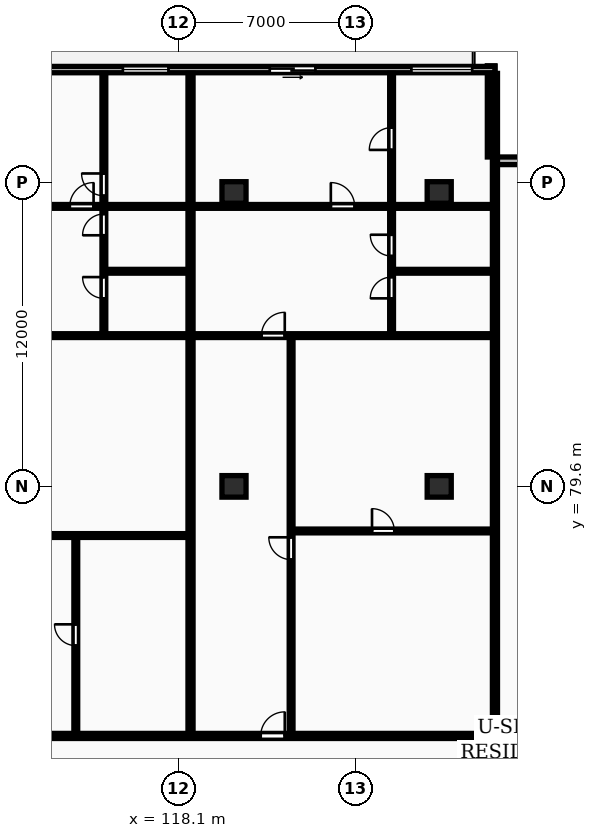
"""IFC4 building model, lengths in metres.
Left out: names, types, materials, properties, quantities, classifications, styles, units other than length and angle.
Written with IfcOpenShell. Run it as: python <this file> out.ifc"""

import sys

from ifc_helpers import new_model, si_unit, direction, frame, frame_2d, origin, origin_2d, place, context, subcontext, project, spatial, rectangle, extrude, element, fill, save


model = new_model("IFC4")
c1 = context("Model", 3, precision=1e-05, world=origin(), true_north=direction((0.0, 1.0)))
c2 = subcontext(c1, "Body", "Model", "MODEL_VIEW")
j1 = project(units=[si_unit("LENGTHUNIT", "METRE"), si_unit("PLANEANGLEUNIT", "RADIAN")], contexts=[c1])
p1 = place(None, origin())
s1 = spatial("IfcSite", under=j1, at=p1, CompositionType="ELEMENT")
p2 = place(p1, origin())
s2 = spatial("IfcBuilding", under=s1, at=p2, CompositionType="ELEMENT")
p3 = place(p2, frame((0.0, 0.0, 106.8)))
s3 = spatial("IfcBuildingStorey", under=s2, at=p3, CompositionType="ELEMENT", Elevation=106.8)
for number, where, z_axis, x_axis in (
    (1, (120.3, 79.6, 0.0), (0.0, 0.0, 1.0), (1.0, 0.0, 0.0)),
    (2, (120.3, 91.2, 0.0), (0.0, 0.0, 1.0), (1.0, 0.0, 0.0)),
    (3, (128.4, 79.6, 0.0), (0.0, 0.0, 1.0), (1.0, 0.0, 0.0)),
    (4, (128.4, 91.2, 0.0), (0.0, 0.0, 1.0), (1.0, 0.0, 0.0)),
):
    element("IfcColumn", number, at=place(p3, frame(where, z_axis=z_axis, x_axis=x_axis)), inside=s3, PredefinedType="COLUMN", context=c2, shape_type="SweptSolid", body=[
        extrude(rectangle(XDim=0.95, YDim=0.85, at=origin_2d()), origin(), (0.0, 0.0, 1.0), 3.25),
    ])
for number, where, z_axis, x_axis in (
    (5, (134.2, 92.45, 0.0), (0.0, 0.0, 1.0), (-1.0, 0.0, 0.0)),
    (6, (130.45, 92.6, 0.0), (0.0, 0.0, 1.0), (0.0, 1.0, 0.0)),
):
    element("IfcWall", number, at=place(p3, frame(where, z_axis=z_axis, x_axis=x_axis)), inside=s3, PredefinedType="STANDARD", context=c2, shape_type="SweptSolid", body=[
        extrude(rectangle(XDim=3.6, YDim=0.3, at=frame_2d((1.8, 0.0))), origin(), (0.0, 0.0, 1.0), 2.97),
    ])
p4 = place(p3, frame((130.6, 96.05, 0.0), z_axis=(0.0, 0.0, 1.0), x_axis=(-1.0, 0.0, 0.0)))
e7 = element("IfcWall", 7, at=p4, inside=s3, PredefinedType="STANDARD", context=c2, shape_type="SweptSolid", body=[
    extrude(rectangle(XDim=73.0, YDim=0.25, at=frame_2d((36.5, 0.0))), origin(), (0.0, 0.0, 1.0), 2.97),
])
p5 = place(p4, frame((68.319, 0.0, 0.0)))
e8 = element("IfcOpeningElement", 8, at=p5, cuts=e7, PredefinedType="OPENING", context=c2, shape_type="SweptSolid", body=[
    extrude(rectangle(XDim=1.8, YDim=2.2, at=frame_2d((0.9, 1.1))), frame((0.0, 0.135, 0.0), z_axis=(0.0, -1.0, 0.0), x_axis=(1.0, 0.0, 0.0)), (0.0, 0.0, 1.0), 0.27),
])
p6 = place(p4, frame((59.277, 0.0, 0.85)))
e9 = element("IfcOpeningElement", 9, at=p6, cuts=e7, PredefinedType="OPENING", context=c2, shape_type="SweptSolid", body=[
    extrude(rectangle(XDim=2.4, YDim=1.9, at=frame_2d((1.2, 0.95))), frame((0.0, 0.135, 0.0), z_axis=(0.0, -1.0, 0.0), x_axis=(1.0, 0.0, 0.0)), (0.0, 0.0, 1.0), 0.27),
])
p7 = place(p4, frame((50.199, 0.0, 0.0)))
e10 = element("IfcOpeningElement", 10, at=p7, cuts=e7, PredefinedType="OPENING", context=c2, shape_type="SweptSolid", body=[
    extrude(rectangle(XDim=1.8, YDim=2.2, at=frame_2d((0.9, 1.1))), frame((0.0, 0.135, 0.0), z_axis=(0.0, -1.0, 0.0), x_axis=(1.0, 0.0, 0.0)), (0.0, 0.0, 1.0), 0.27),
])
p8 = place(p4, frame((40.481, 0.0, 0.85)))
e11 = element("IfcOpeningElement", 11, at=p8, cuts=e7, PredefinedType="OPENING", context=c2, shape_type="SweptSolid", body=[
    extrude(rectangle(XDim=2.4, YDim=1.9, at=frame_2d((1.2, 0.95))), frame((0.0, 0.135, 0.0), z_axis=(0.0, -1.0, 0.0), x_axis=(1.0, 0.0, 0.0)), (0.0, 0.0, 1.0), 0.27),
])
p9 = place(p4, frame((31.93, 0.0, 0.0)))
e12 = element("IfcOpeningElement", 12, at=p9, cuts=e7, PredefinedType="OPENING", context=c2, shape_type="SweptSolid", body=[
    extrude(rectangle(XDim=1.8, YDim=2.2, at=frame_2d((0.9, 1.1))), frame((0.0, 0.135, 0.0), z_axis=(0.0, -1.0, 0.0), x_axis=(1.0, 0.0, 0.0)), (0.0, 0.0, 1.0), 0.27),
])
p10 = place(p4, frame((26.042, 0.0, 0.85)))
e13 = element("IfcOpeningElement", 13, at=p10, cuts=e7, PredefinedType="OPENING", context=c2, shape_type="SweptSolid", body=[
    extrude(rectangle(XDim=2.4, YDim=1.9, at=frame_2d((1.2, 0.95))), frame((0.0, 0.135, 0.0), z_axis=(0.0, -1.0, 0.0), x_axis=(1.0, 0.0, 0.0)), (0.0, 0.0, 1.0), 0.27),
])
p11 = place(p4, frame((19.15, 0.0, 0.0)))
e14 = element("IfcOpeningElement", 14, at=p11, cuts=e7, PredefinedType="OPENING", context=c2, shape_type="SweptSolid", body=[
    extrude(rectangle(XDim=1.8, YDim=2.2, at=frame_2d((0.9, 1.1))), frame((0.0, 0.135, 0.0), z_axis=(0.0, -1.0, 0.0), x_axis=(1.0, 0.0, 0.0)), (0.0, 0.0, 1.0), 0.27),
])
p12 = place(p4, frame((12.886, 0.0, 0.85)))
e15 = element("IfcOpeningElement", 15, at=p12, cuts=e7, PredefinedType="OPENING", context=c2, shape_type="SweptSolid", body=[
    extrude(rectangle(XDim=1.8, YDim=1.8, at=frame_2d((0.9, 0.9))), frame((0.0, 0.135, 0.0), z_axis=(0.0, -1.0, 0.0), x_axis=(1.0, 0.0, 0.0)), (0.0, 0.0, 1.0), 0.27),
])
p13 = place(p4, frame((7.088, 0.0, 0.0)))
e16 = element("IfcOpeningElement", 16, at=p13, cuts=e7, PredefinedType="OPENING", context=c2, shape_type="SweptSolid", body=[
    extrude(rectangle(XDim=1.8, YDim=2.2, at=frame_2d((0.9, 1.1))), frame((0.0, 0.135, 0.0), z_axis=(0.0, -1.0, 0.0), x_axis=(1.0, 0.0, 0.0)), (0.0, 0.0, 1.0), 0.27),
])
p14 = place(p4, frame((0.9, 0.0, 0.85)))
e17 = element("IfcOpeningElement", 17, at=p14, cuts=e7, PredefinedType="OPENING", context=c2, shape_type="SweptSolid", body=[
    extrude(rectangle(XDim=2.4, YDim=1.9, at=frame_2d((1.2, 0.95))), frame((0.0, 0.135, 0.0), z_axis=(0.0, -1.0, 0.0), x_axis=(1.0, 0.0, 0.0)), (0.0, 0.0, 1.0), 0.27),
])
for number, where, z_axis, x_axis in (
    (18, (130.6, 69.83, 0.0), (0.0, 0.0, 1.0), (0.0, 1.0, 0.0)),
    (19, (118.584, 69.83, 0.0), (0.0, 0.0, 1.0), (0.0, 1.0, 0.0)),
):
    element("IfcWall", number, at=place(p3, frame(where, z_axis=z_axis, x_axis=x_axis)), inside=s3, PredefinedType="PARTITIONING", context=c2, shape_type="SweptSolid", body=[
        extrude(rectangle(XDim=26.07, YDim=0.2, at=frame_2d((13.035, 0.0))), origin(), (0.0, 0.0, 1.0), 2.97),
    ])
p15 = place(p3, frame((114.055, 69.81, 0.0), z_axis=(0.0, 0.0, 1.0), x_axis=(0.0, 1.0, 0.0)))
e20 = element("IfcWall", 20, at=p15, inside=s3, PredefinedType="PARTITIONING", context=c2, shape_type="SweptSolid", body=[
    extrude(rectangle(XDim=7.85, YDim=0.15, at=frame_2d((3.925, 0.0))), origin(), (0.0, 0.0, 1.0), 2.97),
])
p16 = place(p15, frame((3.505, 0.0, 0.0)))
e21 = element("IfcOpeningElement", 21, at=p16, cuts=e20, PredefinedType="OPENING", context=c2, shape_type="SweptSolid", body=[
    extrude(rectangle(XDim=0.84, YDim=2.04, at=frame_2d((0.42, 1.02))), frame((0.0, 0.085, 0.0), z_axis=(0.0, -1.0, 0.0), x_axis=(1.0, 0.0, 0.0)), (0.0, 0.0, 1.0), 0.17),
])
p17 = place(p3, frame((109.847, 77.66, 0.0), z_axis=(0.0, 0.0, 1.0), x_axis=(1.0, 0.0, 0.0)))
e22 = element("IfcWall", 22, at=p17, inside=s3, PredefinedType="PARTITIONING", context=c2, shape_type="SweptSolid", body=[
    extrude(rectangle(XDim=8.657, YDim=0.15, at=frame_2d((4.329, 0.0))), origin(), (0.0, 0.0, 1.0), 2.97),
])
p18 = place(p17, frame((0.35, 0.0, 0.0)))
e23 = element("IfcOpeningElement", 23, at=p18, cuts=e22, PredefinedType="OPENING", context=c2, shape_type="SweptSolid", body=[
    extrude(rectangle(XDim=0.88, YDim=2.06, at=frame_2d((0.44, 1.03))), frame((0.0, 0.085, 0.0), z_axis=(0.0, -1.0, 0.0), x_axis=(1.0, 0.0, 0.0)), (0.0, 0.0, 1.0), 0.17),
])
p19 = place(p3, frame((115.224, 88.09, 0.0), z_axis=(0.0, 0.0, 1.0), x_axis=(1.0, 0.0, 0.0)))
e24 = element("IfcWall", 24, at=p19, inside=s3, PredefinedType="PARTITIONING", context=c2, shape_type="SweptSolid", body=[
    extrude(rectangle(XDim=3.28, YDim=0.15, at=frame_2d((1.64, 0.0))), origin(), (0.0, 0.0, 1.0), 2.97),
])
p20 = place(p3, frame((115.164, 85.59, 0.0), z_axis=(0.0, 0.0, 1.0), x_axis=(0.0, 1.0, 0.0)))
e25 = element("IfcWall", 25, at=p20, inside=s3, PredefinedType="PARTITIONING", context=c2, shape_type="SweptSolid", body=[
    extrude(rectangle(XDim=10.31, YDim=0.15, at=frame_2d((5.155, 0.0))), origin(), (0.0, 0.0, 1.0), 2.97),
])
p21 = place(p20, frame((1.43, 0.0, 0.0)))
e26 = element("IfcOpeningElement", 26, at=p21, cuts=e25, PredefinedType="OPENING", context=c2, shape_type="SweptSolid", body=[
    extrude(rectangle(XDim=0.84, YDim=2.04, at=frame_2d((0.42, 1.02))), frame((0.0, 0.085, 0.0), z_axis=(0.0, -1.0, 0.0), x_axis=(1.0, 0.0, 0.0)), (0.0, 0.0, 1.0), 0.17),
])
p22 = place(p20, frame((3.92, 0.0, 0.0)))
e27 = element("IfcOpeningElement", 27, at=p22, cuts=e25, PredefinedType="OPENING", context=c2, shape_type="SweptSolid", body=[
    extrude(rectangle(XDim=0.84, YDim=2.04, at=frame_2d((0.42, 1.02))), frame((0.0, 0.085, 0.0), z_axis=(0.0, -1.0, 0.0), x_axis=(1.0, 0.0, 0.0)), (0.0, 0.0, 1.0), 0.17),
])
p23 = place(p20, frame((5.48, 0.0, 0.0)))
e28 = element("IfcOpeningElement", 28, at=p23, cuts=e25, PredefinedType="OPENING", context=c2, shape_type="SweptSolid", body=[
    extrude(rectangle(XDim=0.88, YDim=2.06, at=frame_2d((0.44, 1.03))), frame((0.0, 0.085, 0.0), z_axis=(0.0, -1.0, 0.0), x_axis=(1.0, 0.0, 0.0)), (0.0, 0.0, 1.0), 0.17),
])
p24 = place(p3, frame((105.896, 85.55, 0.0), z_axis=(0.0, 0.0, 1.0), x_axis=(1.0, 0.0, 0.0)))
e29 = element("IfcWall", 29, at=p24, inside=s3, PredefinedType="PARTITIONING", context=c2, shape_type="SweptSolid", body=[
    extrude(rectangle(XDim=12.607, YDim=0.15, at=frame_2d((6.304, 0.0))), origin(), (0.0, 0.0, 1.0), 2.97),
])
p25 = place(p24, frame((2.72, 0.0, 0.0)))
e30 = element("IfcOpeningElement", 30, at=p25, cuts=e29, PredefinedType="OPENING", context=c2, shape_type="SweptSolid", body=[
    extrude(rectangle(XDim=0.92, YDim=2.08, at=frame_2d((0.46, 1.04))), frame((0.0, 0.085, 0.0), z_axis=(0.0, -1.0, 0.0), x_axis=(1.0, 0.0, 0.0)), (0.0, 0.0, 1.0), 0.17),
])
p26 = place(p3, frame((105.896, 90.65, 0.0), z_axis=(0.0, 0.0, 1.0), x_axis=(1.0, 0.0, 0.0)))
e31 = element("IfcWall", 31, at=p26, inside=s3, PredefinedType="PARTITIONING", context=c2, shape_type="SweptSolid", body=[
    extrude(rectangle(XDim=12.607, YDim=0.15, at=frame_2d((6.304, 0.0))), origin(), (0.0, 0.0, 1.0), 2.97),
])
p27 = place(p26, frame((7.921, 0.0, 0.0)))
e32 = element("IfcOpeningElement", 32, at=p27, cuts=e31, PredefinedType="OPENING", context=c2, shape_type="SweptSolid", body=[
    extrude(rectangle(XDim=0.94, YDim=2.1, at=frame_2d((0.47, 1.05))), frame((0.0, 0.085, 0.0), z_axis=(0.0, -1.0, 0.0), x_axis=(1.0, 0.0, 0.0)), (0.0, 0.0, 1.0), 0.17),
])
p28 = place(p3, frame((122.614, 77.84, 0.0), z_axis=(0.0, 0.0, 1.0), x_axis=(1.0, 0.0, 0.0)))
e33 = element("IfcWall", 33, at=p28, inside=s3, PredefinedType="PARTITIONING", context=c2, shape_type="SweptSolid", body=[
    extrude(rectangle(XDim=7.906, YDim=0.15, at=frame_2d((3.953, 0.0))), origin(), (0.0, 0.0, 1.0), 2.97),
])
p29 = place(p28, frame((3.134, 0.0, 0.0)))
e34 = element("IfcOpeningElement", 34, at=p29, cuts=e33, PredefinedType="OPENING", context=c2, shape_type="SweptSolid", body=[
    extrude(rectangle(XDim=0.88, YDim=2.06, at=frame_2d((0.44, 1.03))), frame((0.0, 0.085, 0.0), z_axis=(0.0, -1.0, 0.0), x_axis=(1.0, 0.0, 0.0)), (0.0, 0.0, 1.0), 0.17),
])
p30 = place(p3, frame((122.554, 69.81, 0.0), z_axis=(0.0, 0.0, 1.0), x_axis=(0.0, 1.0, 0.0)))
e35 = element("IfcWall", 35, at=p30, inside=s3, PredefinedType="PARTITIONING", context=c2, shape_type="SweptSolid", body=[
    extrude(rectangle(XDim=15.7, YDim=0.15, at=frame_2d((7.85, 0.0))), origin(), (0.0, 0.0, 1.0), 2.97),
])
p31 = place(p30, frame((6.9, 0.0, 0.0)))
e36 = element("IfcOpeningElement", 36, at=p31, cuts=e35, PredefinedType="OPENING", context=c2, shape_type="SweptSolid", body=[
    extrude(rectangle(XDim=0.88, YDim=2.06, at=frame_2d((0.44, 1.03))), frame((0.0, 0.085, 0.0), z_axis=(0.0, -1.0, 0.0), x_axis=(1.0, 0.0, 0.0)), (0.0, 0.0, 1.0), 0.17),
])
p32 = place(p3, frame((126.58, 88.09, 0.0), z_axis=(0.0, 0.0, 1.0), x_axis=(1.0, 0.0, 0.0)))
e37 = element("IfcWall", 37, at=p32, inside=s3, PredefinedType="PARTITIONING", context=c2, shape_type="SweptSolid", body=[
    extrude(rectangle(XDim=3.94, YDim=0.15, at=frame_2d((1.97, 0.0))), origin(), (0.0, 0.0, 1.0), 2.97),
])
p33 = place(p3, frame((126.52, 85.59, 0.0), z_axis=(0.0, 0.0, 1.0), x_axis=(0.0, 1.0, 0.0)))
e38 = element("IfcWall", 38, at=p33, inside=s3, PredefinedType="PARTITIONING", context=c2, shape_type="SweptSolid", body=[
    extrude(rectangle(XDim=10.31, YDim=0.15, at=frame_2d((5.155, 0.0))), origin(), (0.0, 0.0, 1.0), 2.97),
])
p34 = place(p33, frame((1.43, 0.0, 0.0)))
e39 = element("IfcOpeningElement", 39, at=p34, cuts=e38, PredefinedType="OPENING", context=c2, shape_type="SweptSolid", body=[
    extrude(rectangle(XDim=0.84, YDim=2.04, at=frame_2d((0.42, 1.02))), frame((0.0, 0.085, 0.0), z_axis=(0.0, -1.0, 0.0), x_axis=(1.0, 0.0, 0.0)), (0.0, 0.0, 1.0), 0.17),
])
p35 = place(p33, frame((3.102, 0.0, 0.0)))
e40 = element("IfcOpeningElement", 40, at=p35, cuts=e38, PredefinedType="OPENING", context=c2, shape_type="SweptSolid", body=[
    extrude(rectangle(XDim=0.84, YDim=2.04, at=frame_2d((0.42, 1.02))), frame((0.0, 0.085, 0.0), z_axis=(0.0, -1.0, 0.0), x_axis=(1.0, 0.0, 0.0)), (0.0, 0.0, 1.0), 0.17),
])
p36 = place(p33, frame((7.29, 0.0, 0.0)))
e41 = element("IfcOpeningElement", 41, at=p36, cuts=e38, PredefinedType="OPENING", context=c2, shape_type="SweptSolid", body=[
    extrude(rectangle(XDim=0.88, YDim=2.06, at=frame_2d((0.44, 1.03))), frame((0.0, 0.085, 0.0), z_axis=(0.0, -1.0, 0.0), x_axis=(1.0, 0.0, 0.0)), (0.0, 0.0, 1.0), 0.17),
])
p37 = place(p3, frame((118.664, 85.55, 0.0), z_axis=(0.0, 0.0, 1.0), x_axis=(1.0, 0.0, 0.0)))
e42 = element("IfcWall", 42, at=p37, inside=s3, PredefinedType="PARTITIONING", context=c2, shape_type="SweptSolid", body=[
    extrude(rectangle(XDim=11.856, YDim=0.15, at=frame_2d((5.928, 0.0))), origin(), (0.0, 0.0, 1.0), 2.97),
])
p38 = place(p37, frame((2.72, 0.0, 0.0)))
e43 = element("IfcOpeningElement", 43, at=p38, cuts=e42, PredefinedType="OPENING", context=c2, shape_type="SweptSolid", body=[
    extrude(rectangle(XDim=0.92, YDim=2.08, at=frame_2d((0.46, 1.04))), frame((0.0, 0.085, 0.0), z_axis=(0.0, -1.0, 0.0), x_axis=(1.0, 0.0, 0.0)), (0.0, 0.0, 1.0), 0.17),
])
p39 = place(p3, frame((118.664, 90.65, 0.0), z_axis=(0.0, 0.0, 1.0), x_axis=(1.0, 0.0, 0.0)))
e44 = element("IfcWall", 44, at=p39, inside=s3, PredefinedType="PARTITIONING", context=c2, shape_type="SweptSolid", body=[
    extrude(rectangle(XDim=11.856, YDim=0.15, at=frame_2d((5.928, 0.0))), origin(), (0.0, 0.0, 1.0), 2.97),
])
p40 = place(p39, frame((5.458, 0.0, 0.0)))
e45 = element("IfcOpeningElement", 45, at=p40, cuts=e44, PredefinedType="OPENING", context=c2, shape_type="SweptSolid", body=[
    extrude(rectangle(XDim=0.94, YDim=2.1, at=frame_2d((0.47, 1.05))), frame((0.0, 0.085, 0.0), z_axis=(0.0, -1.0, 0.0), x_axis=(1.0, 0.0, 0.0)), (0.0, 0.0, 1.0), 0.17),
])
p41 = place(p3, frame((57.6, 69.75, 0.0), z_axis=(0.0, 0.0, 1.0), x_axis=(1.0, 0.0, 0.0)))
e46 = element("IfcWall", 46, at=p41, inside=s3, PredefinedType="PARTITIONING", context=c2, shape_type="SweptSolid", body=[
    extrude(rectangle(XDim=73.0, YDim=0.2, at=frame_2d((36.5, 0.0))), origin(), (0.0, 0.0, 1.0), 2.97),
])
p42 = place(p41, frame((7.172, 0.0, 0.0)))
e47 = element("IfcOpeningElement", 47, at=p42, cuts=e46, PredefinedType="OPENING", context=c2, shape_type="SweptSolid", body=[
    extrude(rectangle(XDim=1.22, YDim=2.18, at=frame_2d((0.61, 1.09))), frame((0.0, 0.11, 0.0), z_axis=(0.0, -1.0, 0.0), x_axis=(1.0, 0.0, 0.0)), (0.0, 0.0, 1.0), 0.22),
])
p43 = place(p41, frame((23.96, 0.0, 0.0)))
e48 = element("IfcOpeningElement", 48, at=p43, cuts=e46, PredefinedType="OPENING", context=c2, shape_type="SweptSolid", body=[
    extrude(rectangle(XDim=1.22, YDim=2.18, at=frame_2d((0.61, 1.09))), frame((0.0, 0.11, 0.0), z_axis=(0.0, -1.0, 0.0), x_axis=(1.0, 0.0, 0.0)), (0.0, 0.0, 1.0), 0.22),
])
p44 = place(p41, frame((38.846, 0.0, 0.0)))
e49 = element("IfcOpeningElement", 49, at=p44, cuts=e46, PredefinedType="OPENING", context=c2, shape_type="SweptSolid", body=[
    extrude(rectangle(XDim=0.95, YDim=2.15, at=frame_2d((0.475, 1.075))), frame((0.0, 0.11, 0.0), z_axis=(0.0, -1.0, 0.0), x_axis=(1.0, 0.0, 0.0)), (0.0, 0.0, 1.0), 0.22),
])
p45 = place(p41, frame((50.262, 0.0, 0.0)))
e50 = element("IfcOpeningElement", 50, at=p45, cuts=e46, PredefinedType="OPENING", context=c2, shape_type="SweptSolid", body=[
    extrude(rectangle(XDim=0.95, YDim=2.15, at=frame_2d((0.475, 1.075))), frame((0.0, 0.11, 0.0), z_axis=(0.0, -1.0, 0.0), x_axis=(1.0, 0.0, 0.0)), (0.0, 0.0, 1.0), 0.22),
])
p46 = place(p41, frame((63.754, 0.0, 0.0)))
e51 = element("IfcOpeningElement", 51, at=p46, cuts=e46, PredefinedType="OPENING", context=c2, shape_type="SweptSolid", body=[
    extrude(rectangle(XDim=0.95, YDim=2.15, at=frame_2d((0.475, 1.075))), frame((0.0, 0.11, 0.0), z_axis=(0.0, -1.0, 0.0), x_axis=(1.0, 0.0, 0.0)), (0.0, 0.0, 1.0), 0.22),
])
p47 = place(p12, origin())
e52 = element("IfcWindow", 52, at=p47, inside=s3, PartitioningType="SINGLE_PANEL", PredefinedType="WINDOW", context=c2, shape_type="SweptSolid", body=[
    extrude(rectangle(XDim=1.8, YDim=1.8, at=frame_2d((0.9, 0.9))), frame((0.0, 0.03, 0.0), z_axis=(0.0, -1.0, 0.0), x_axis=(1.0, 0.0, 0.0)), (0.0, 0.0, 1.0), 0.06),
])
fill(e15, e52)
p48 = place(p13, origin())
e53 = element("IfcDoor", 53, at=p48, inside=s3, OperationType="SLIDING_TO_LEFT", PredefinedType="DOOR", context=c2, shape_type="SweptSolid", body=[
    extrude(rectangle(XDim=1.8, YDim=2.2, at=frame_2d((0.9, 1.1))), frame((0.0, 0.025, 0.0), z_axis=(0.0, -1.0, 0.0), x_axis=(1.0, 0.0, 0.0)), (0.0, 0.0, 1.0), 0.05),
])
fill(e16, e53)
p49 = place(p14, origin())
e54 = element("IfcWindow", 54, at=p49, inside=s3, PartitioningType="DOUBLE_PANEL_VERTICAL", PredefinedType="WINDOW", context=c2, shape_type="SweptSolid", body=[
    extrude(rectangle(XDim=2.4, YDim=1.9, at=frame_2d((1.2, 0.95))), frame((0.0, 0.03, 0.0), z_axis=(0.0, -1.0, 0.0), x_axis=(1.0, 0.0, 0.0)), (0.0, 0.0, 1.0), 0.06),
])
fill(e17, e54)
p50 = place(p16, origin())
e55 = element("IfcDoor", 55, at=p50, inside=s3, OperationType="SINGLE_SWING_RIGHT", PredefinedType="DOOR", context=c2, shape_type="SweptSolid", body=[
    extrude(rectangle(XDim=0.84, YDim=2.04, at=frame_2d((0.42, 1.02))), frame((0.0, 0.025, 0.0), z_axis=(0.0, -1.0, 0.0), x_axis=(1.0, 0.0, 0.0)), (0.0, 0.0, 1.0), 0.05),
])
fill(e21, e55)
p51 = place(p21, origin())
e56 = element("IfcDoor", 56, at=p51, inside=s3, OperationType="SINGLE_SWING_RIGHT", PredefinedType="DOOR", context=c2, shape_type="SweptSolid", body=[
    extrude(rectangle(XDim=0.84, YDim=2.04, at=frame_2d((0.42, 1.02))), frame((0.0, 0.025, 0.0), z_axis=(0.0, -1.0, 0.0), x_axis=(1.0, 0.0, 0.0)), (0.0, 0.0, 1.0), 0.05),
])
fill(e26, e56)
p52 = place(p22, origin())
e57 = element("IfcDoor", 57, at=p52, inside=s3, OperationType="SINGLE_SWING_LEFT", PredefinedType="DOOR", context=c2, shape_type="SweptSolid", body=[
    extrude(rectangle(XDim=0.84, YDim=2.04, at=frame_2d((0.42, 1.02))), frame((0.0, 0.025, 0.0), z_axis=(0.0, -1.0, 0.0), x_axis=(1.0, 0.0, 0.0)), (0.0, 0.0, 1.0), 0.05),
])
fill(e27, e57)
p53 = place(p23, origin())
e58 = element("IfcDoor", 58, at=p53, inside=s3, OperationType="SINGLE_SWING_RIGHT", PredefinedType="DOOR", context=c2, shape_type="SweptSolid", body=[
    extrude(rectangle(XDim=0.88, YDim=2.06, at=frame_2d((0.44, 1.03))), frame((0.0, 0.025, 0.0), z_axis=(0.0, -1.0, 0.0), x_axis=(1.0, 0.0, 0.0)), (0.0, 0.0, 1.0), 0.05),
])
fill(e28, e58)
p54 = place(p27, origin())
e59 = element("IfcDoor", 59, at=p54, inside=s3, OperationType="SINGLE_SWING_RIGHT", PredefinedType="DOOR", context=c2, shape_type="SweptSolid", body=[
    extrude(rectangle(XDim=0.94, YDim=2.1, at=frame_2d((0.47, 1.05))), frame((0.0, 0.025, 0.0), z_axis=(0.0, -1.0, 0.0), x_axis=(1.0, 0.0, 0.0)), (0.0, 0.0, 1.0), 0.05),
])
fill(e32, e59)
p55 = place(p29, origin())
e60 = element("IfcDoor", 60, at=p55, inside=s3, OperationType="SINGLE_SWING_LEFT", PredefinedType="DOOR", context=c2, shape_type="SweptSolid", body=[
    extrude(rectangle(XDim=0.88, YDim=2.06, at=frame_2d((0.44, 1.03))), frame((0.0, 0.025, 0.0), z_axis=(0.0, -1.0, 0.0), x_axis=(1.0, 0.0, 0.0)), (0.0, 0.0, 1.0), 0.05),
])
fill(e34, e60)
p56 = place(p31, origin())
e61 = element("IfcDoor", 61, at=p56, inside=s3, OperationType="SINGLE_SWING_RIGHT", PredefinedType="DOOR", context=c2, shape_type="SweptSolid", body=[
    extrude(rectangle(XDim=0.88, YDim=2.06, at=frame_2d((0.44, 1.03))), frame((0.0, 0.025, 0.0), z_axis=(0.0, -1.0, 0.0), x_axis=(1.0, 0.0, 0.0)), (0.0, 0.0, 1.0), 0.05),
])
fill(e36, e61)
p57 = place(p34, origin())
e62 = element("IfcDoor", 62, at=p57, inside=s3, OperationType="SINGLE_SWING_LEFT", PredefinedType="DOOR", context=c2, shape_type="SweptSolid", body=[
    extrude(rectangle(XDim=0.84, YDim=2.04, at=frame_2d((0.42, 1.02))), frame((0.0, 0.025, 0.0), z_axis=(0.0, -1.0, 0.0), x_axis=(1.0, 0.0, 0.0)), (0.0, 0.0, 1.0), 0.05),
])
fill(e39, e62)
p58 = place(p35, origin())
e63 = element("IfcDoor", 63, at=p58, inside=s3, OperationType="SINGLE_SWING_RIGHT", PredefinedType="DOOR", context=c2, shape_type="SweptSolid", body=[
    extrude(rectangle(XDim=0.84, YDim=2.04, at=frame_2d((0.42, 1.02))), frame((0.0, 0.025, 0.0), z_axis=(0.0, -1.0, 0.0), x_axis=(1.0, 0.0, 0.0)), (0.0, 0.0, 1.0), 0.05),
])
fill(e40, e63)
p59 = place(p36, origin())
e64 = element("IfcDoor", 64, at=p59, inside=s3, OperationType="SINGLE_SWING_LEFT", PredefinedType="DOOR", context=c2, shape_type="SweptSolid", body=[
    extrude(rectangle(XDim=0.88, YDim=2.06, at=frame_2d((0.44, 1.03))), frame((0.0, 0.025, 0.0), z_axis=(0.0, -1.0, 0.0), x_axis=(1.0, 0.0, 0.0)), (0.0, 0.0, 1.0), 0.05),
])
fill(e41, e64)
p60 = place(p38, origin())
e65 = element("IfcDoor", 65, at=p60, inside=s3, OperationType="SINGLE_SWING_RIGHT", PredefinedType="DOOR", context=c2, shape_type="SweptSolid", body=[
    extrude(rectangle(XDim=0.92, YDim=2.08, at=frame_2d((0.46, 1.04))), frame((0.0, 0.025, 0.0), z_axis=(0.0, -1.0, 0.0), x_axis=(1.0, 0.0, 0.0)), (0.0, 0.0, 1.0), 0.05),
])
fill(e43, e65)
p61 = place(p40, origin())
e66 = element("IfcDoor", 66, at=p61, inside=s3, OperationType="SINGLE_SWING_LEFT", PredefinedType="DOOR", context=c2, shape_type="SweptSolid", body=[
    extrude(rectangle(XDim=0.94, YDim=2.1, at=frame_2d((0.47, 1.05))), frame((0.0, 0.025, 0.0), z_axis=(0.0, -1.0, 0.0), x_axis=(1.0, 0.0, 0.0)), (0.0, 0.0, 1.0), 0.05),
])
fill(e45, e66)
p62 = place(p46, origin())
e67 = element("IfcDoor", 67, at=p62, inside=s3, OperationType="SINGLE_SWING_RIGHT", PredefinedType="DOOR", context=c2, shape_type="SweptSolid", body=[
    extrude(rectangle(XDim=0.95, YDim=2.15, at=frame_2d((0.475, 1.075))), frame((0.0, 0.025, 0.0), z_axis=(0.0, -1.0, 0.0), x_axis=(1.0, 0.0, 0.0)), (0.0, 0.0, 1.0), 0.05),
])
fill(e51, e67)
save(model, sys.argv[1])
